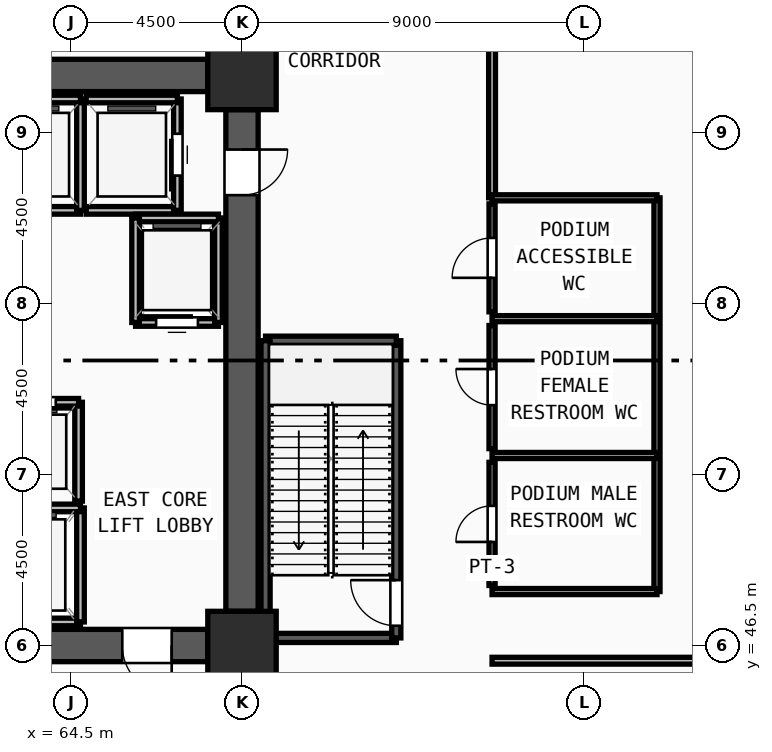
"""IFC4 building model, lengths in metres.
Left out: names, types, materials, properties, quantities, classifications, styles, units other than length and angle.
Written with IfcOpenShell. Run it as: python <this file> out.ifc"""

import sys

from ifc_helpers import new_model, si_unit, direction, frame, frame_2d, origin, origin_2d, place, context, subcontext, project, spatial, rectangle, extrude, source, transform, mapped, element, fill, save


model = new_model("IFC4")
c1 = context("Model", 3, precision=1e-05, world=origin(), true_north=direction((0.0, 1.0)))
c2 = subcontext(c1, "Body", "Model", "MODEL_VIEW")
j1 = project(units=[si_unit("LENGTHUNIT", "METRE"), si_unit("PLANEANGLEUNIT", "RADIAN")], contexts=[c1])
p1 = place(None, origin())
s1 = spatial("IfcSite", under=j1, at=p1, CompositionType="ELEMENT")
p2 = place(p1, origin())
s2 = spatial("IfcBuilding", under=s1, at=p2, CompositionType="ELEMENT")
p3 = place(p2, origin())
s3 = spatial("IfcBuildingStorey", under=s2, at=p3, CompositionType="ELEMENT", Elevation=0.0)
m1 = source(origin(), c2, "Body", "SweptSolid", [
    extrude(rectangle(XDim=1.8, YDim=1.8, at=origin_2d()), origin(), (0.0, 0.0, 1.0), 5.4),
])
for number, where, z_axis, x_axis in (
    (1, (69.0, 46.5, 0.0), (0.0, 0.0, 1.0), (1.0, 0.0, 0.0)),
    (2, (69.0, 61.5, 0.0), (0.0, 0.0, 1.0), (1.0, 0.0, 0.0)),
):
    element("IfcColumn", number, at=place(p3, frame(where, z_axis=z_axis, x_axis=x_axis)), inside=s3, PredefinedType="COLUMN", context=c2, shape_type="MappedRepresentation", body=[
        mapped(m1, transform((0.0, 0.0, 0.0), x_axis=(1.0, 0.0, 0.0), y_axis=(0.0, 1.0, 0.0), z_axis=(0.0, 0.0, 1.0), scale=1.0)),
    ])
p4 = place(p3, frame((60.9, 61.5, 0.0), z_axis=(0.0, 0.0, 1.0), x_axis=(1.0, 0.0, 0.0)))
e3 = element("IfcWall", 3, at=p4, inside=s3, PredefinedType="SHEAR", context=c2, shape_type="SweptSolid", body=[
    extrude(rectangle(XDim=7.2, YDim=0.85, at=frame_2d((3.6, 0.0))), origin(), (0.0, 0.0, 1.0), 5.15),
])
p5 = place(p3, frame((69.0, 60.6, 0.0), z_axis=(0.0, 0.0, 1.0), x_axis=(0.0, -1.0, 0.0)))
e4 = element("IfcWall", 4, at=p5, inside=s3, PredefinedType="SHEAR", context=c2, shape_type="SweptSolid", body=[
    extrude(rectangle(XDim=13.2, YDim=0.85, at=frame_2d((6.6, 0.0))), origin(), (0.0, 0.0, 1.0), 5.15),
])
m2 = source(origin(), c2, "Body", "SweptSolid", [
    extrude(rectangle(XDim=1.2, YDim=2.2, at=frame_2d((0.6, 1.1))), frame((0.0, 0.435, 0.0), z_axis=(0.0, -1.0, 0.0), x_axis=(1.0, 0.0, 0.0)), (0.0, 0.0, 1.0), 0.87),
])
p6 = place(p5, frame((1.05, 0.0, 0.0)))
e5 = element("IfcOpeningElement", 5, at=p6, cuts=e4, PredefinedType="OPENING", context=c2, shape_type="MappedRepresentation", body=[
    mapped(m2, transform((0.0, 0.0, 0.0), x_axis=(1.0, 0.0, 0.0), y_axis=(0.0, 1.0, 0.0), z_axis=(0.0, 0.0, 1.0), scale=1.0)),
])
p7 = place(p3, frame((68.1, 46.5, 0.0), z_axis=(0.0, 0.0, 1.0), x_axis=(-1.0, 0.0, 0.0)))
e6 = element("IfcWall", 6, at=p7, inside=s3, PredefinedType="SHEAR", context=c2, shape_type="SweptSolid", body=[
    extrude(rectangle(XDim=7.2, YDim=0.85, at=frame_2d((3.6, 0.0))), origin(), (0.0, 0.0, 1.0), 5.15),
])
m3 = source(origin(), c2, "Body", "SweptSolid", [
    extrude(rectangle(XDim=1.3, YDim=2.2, at=frame_2d((0.65, 1.1))), frame((0.0, 0.435, 0.0), z_axis=(0.0, -1.0, 0.0), x_axis=(1.0, 0.0, 0.0)), (0.0, 0.0, 1.0), 0.87),
])
p8 = place(p7, frame((0.95, 0.0, 0.0)))
e7 = element("IfcOpeningElement", 7, at=p8, cuts=e6, PredefinedType="OPENING", context=c2, shape_type="MappedRepresentation", body=[
    mapped(m3, transform((0.0, 0.0, 0.0), x_axis=(1.0, 0.0, 0.0), y_axis=(0.0, 1.0, 0.0), z_axis=(0.0, 0.0, 1.0), scale=1.0)),
])
p9 = place(p3, frame((69.62, 46.7, 0.0), z_axis=(0.0, 0.0, 1.0), x_axis=(1.0, 0.0, 0.0)))
e8 = element("IfcWall", 8, at=p9, inside=s3, PredefinedType="SOLIDWALL", context=c2, shape_type="SweptSolid", body=[
    extrude(rectangle(XDim=3.44, YDim=0.24, at=frame_2d((1.72, 0.0))), origin(), (0.0, 0.0, 1.0), 5.15),
])
p10 = place(p3, frame((73.06, 46.7, 0.0), z_axis=(0.0, 0.0, 1.0), x_axis=(0.0, 1.0, 0.0)))
e9 = element("IfcWall", 9, at=p10, inside=s3, PredefinedType="SOLIDWALL", context=c2, shape_type="SweptSolid", body=[
    extrude(rectangle(XDim=7.82, YDim=0.24, at=frame_2d((3.91, 0.0))), origin(), (0.0, 0.0, 1.0), 5.15),
])
m4 = source(origin(), c2, "Body", "SweptSolid", [
    extrude(rectangle(XDim=1.2, YDim=2.2, at=frame_2d((0.6, 1.1))), frame((0.0, 0.13, 0.0), z_axis=(0.0, -1.0, 0.0), x_axis=(1.0, 0.0, 0.0)), (0.0, 0.0, 1.0), 0.26),
])
p11 = place(p10, frame((0.32, 0.0, 0.0)))
e10 = element("IfcOpeningElement", 10, at=p11, cuts=e9, PredefinedType="OPENING", context=c2, shape_type="MappedRepresentation", body=[
    mapped(m4, transform((0.0, 0.0, 0.0), x_axis=(1.0, 0.0, 0.0), y_axis=(0.0, 1.0, 0.0), z_axis=(0.0, 0.0, 1.0), scale=1.0)),
])
p12 = place(p3, frame((73.06, 54.52, 0.0), z_axis=(0.0, 0.0, 1.0), x_axis=(-1.0, 0.0, 0.0)))
e11 = element("IfcWall", 11, at=p12, inside=s3, PredefinedType="SOLIDWALL", context=c2, shape_type="SweptSolid", body=[
    extrude(rectangle(XDim=3.44, YDim=0.24, at=frame_2d((1.72, 0.0))), origin(), (0.0, 0.0, 1.0), 5.15),
])
p13 = place(p3, frame((69.62, 54.52, 0.0), z_axis=(0.0, 0.0, 1.0), x_axis=(0.0, -1.0, 0.0)))
e12 = element("IfcWall", 12, at=p13, inside=s3, PredefinedType="SOLIDWALL", context=c2, shape_type="SweptSolid", body=[
    extrude(rectangle(XDim=7.82, YDim=0.24, at=frame_2d((3.91, 0.0))), origin(), (0.0, 0.0, 1.0), 5.15),
])
p14 = place(p3, frame((62.35, 47.12, 0.0), z_axis=(0.0, 0.0, 1.0), x_axis=(1.0, 0.0, 0.0)))
e13 = element("IfcWall", 13, at=p14, inside=s3, PredefinedType="SOLIDWALL", context=c2, shape_type="SweptSolid", body=[
    extrude(rectangle(XDim=2.4, YDim=0.2, at=frame_2d((1.2, 0.0))), origin(), (0.0, 0.0, 1.0), 5.15),
])
p15 = place(p3, frame((64.75, 47.12, 0.0), z_axis=(0.0, 0.0, 1.0), x_axis=(0.0, 1.0, 0.0)))
e14 = element("IfcWall", 14, at=p15, inside=s3, PredefinedType="SOLIDWALL", context=c2, shape_type="SweptSolid", body=[
    extrude(rectangle(XDim=3.0, YDim=0.2, at=frame_2d((1.5, 0.0))), origin(), (0.0, 0.0, 1.0), 5.15),
])
for number, where, z_axis, x_axis in (
    (15, (64.75, 50.12, 0.0), (0.0, 0.0, 1.0), (-1.0, 0.0, 0.0)),
    (16, (62.35, 57.95, 0.0), (0.0, 0.0, 1.0), (1.0, 0.0, 0.0)),
):
    element("IfcWall", number, at=place(p3, frame(where, z_axis=z_axis, x_axis=x_axis)), inside=s3, PredefinedType="SOLIDWALL", context=c2, shape_type="SweptSolid", body=[
        extrude(rectangle(XDim=2.4, YDim=0.2, at=frame_2d((1.2, 0.0))), origin(), (0.0, 0.0, 1.0), 5.15),
    ])
p16 = place(p3, frame((64.75, 57.95, 0.0), z_axis=(0.0, 0.0, 1.0), x_axis=(0.0, 1.0, 0.0)))
e17 = element("IfcWall", 17, at=p16, inside=s3, PredefinedType="SOLIDWALL", context=c2, shape_type="SweptSolid", body=[
    extrude(rectangle(XDim=2.93, YDim=0.2, at=frame_2d((1.465, 0.0))), origin(), (0.0, 0.0, 1.0), 5.15),
])
p17 = place(p3, frame((64.75, 60.88, 0.0), z_axis=(0.0, 0.0, 1.0), x_axis=(-1.0, 0.0, 0.0)))
e18 = element("IfcWall", 18, at=p17, inside=s3, PredefinedType="SOLIDWALL", context=c2, shape_type="SweptSolid", body=[
    extrude(rectangle(XDim=2.4, YDim=0.2, at=frame_2d((1.2, 0.0))), origin(), (0.0, 0.0, 1.0), 5.15),
])
p18 = place(p3, frame((64.9, 57.95, 0.0), z_axis=(0.0, 0.0, 1.0), x_axis=(1.0, 0.0, 0.0)))
e19 = element("IfcWall", 19, at=p18, inside=s3, PredefinedType="SOLIDWALL", context=c2, shape_type="SweptSolid", body=[
    extrude(rectangle(XDim=2.4, YDim=0.2, at=frame_2d((1.2, 0.0))), origin(), (0.0, 0.0, 1.0), 5.15),
])
p19 = place(p3, frame((67.3, 57.95, 0.0), z_axis=(0.0, 0.0, 1.0), x_axis=(0.0, 1.0, 0.0)))
e20 = element("IfcWall", 20, at=p19, inside=s3, PredefinedType="SOLIDWALL", context=c2, shape_type="SweptSolid", body=[
    extrude(rectangle(XDim=2.93, YDim=0.2, at=frame_2d((1.465, 0.0))), origin(), (0.0, 0.0, 1.0), 5.15),
])
m5 = source(origin(), c2, "Body", "SweptSolid", [
    extrude(rectangle(XDim=1.1, YDim=2.2, at=frame_2d((0.55, 1.1))), frame((0.0, 0.11, 0.0), z_axis=(0.0, -1.0, 0.0), x_axis=(1.0, 0.0, 0.0)), (0.0, 0.0, 1.0), 0.22),
])
p20 = place(p19, frame((0.915, 0.0, 0.0)))
e21 = element("IfcOpeningElement", 21, at=p20, cuts=e20, PredefinedType="OPENING", context=c2, shape_type="MappedRepresentation", body=[
    mapped(m5, transform((0.0, 0.0, 0.0), x_axis=(1.0, 0.0, 0.0), y_axis=(0.0, 1.0, 0.0), z_axis=(0.0, 0.0, 1.0), scale=1.0)),
])
p21 = place(p3, frame((67.3, 60.88, 0.0), z_axis=(0.0, 0.0, 1.0), x_axis=(-1.0, 0.0, 0.0)))
e22 = element("IfcWall", 22, at=p21, inside=s3, PredefinedType="SOLIDWALL", context=c2, shape_type="SweptSolid", body=[
    extrude(rectangle(XDim=2.4, YDim=0.2, at=frame_2d((1.2, 0.0))), origin(), (0.0, 0.0, 1.0), 5.15),
])
p22 = place(p3, frame((66.2, 55.0, 0.0), z_axis=(0.0, 0.0, 1.0), x_axis=(1.0, 0.0, 0.0)))
e23 = element("IfcWall", 23, at=p22, inside=s3, PredefinedType="SOLIDWALL", context=c2, shape_type="SweptSolid", body=[
    extrude(rectangle(XDim=2.18, YDim=0.2, at=frame_2d((1.09, 0.0))), origin(), (0.0, 0.0, 1.0), 5.15),
])
p23 = place(p22, frame((0.54, 0.0, 0.0)))
e24 = element("IfcOpeningElement", 24, at=p23, cuts=e23, PredefinedType="OPENING", context=c2, shape_type="MappedRepresentation", body=[
    mapped(m5, transform((0.0, 0.0, 0.0), x_axis=(1.0, 0.0, 0.0), y_axis=(0.0, 1.0, 0.0), z_axis=(0.0, 0.0, 1.0), scale=1.0)),
])
p24 = place(p3, frame((68.38, 55.0, 0.0), z_axis=(0.0, 0.0, 1.0), x_axis=(0.0, 1.0, 0.0)))
e25 = element("IfcWall", 25, at=p24, inside=s3, PredefinedType="SOLIDWALL", context=c2, shape_type="SweptSolid", body=[
    extrude(rectangle(XDim=2.75, YDim=0.2, at=frame_2d((1.375, 0.0))), origin(), (0.0, 0.0, 1.0), 5.15),
])
p25 = place(p3, frame((68.38, 57.75, 0.0), z_axis=(0.0, 0.0, 1.0), x_axis=(-1.0, 0.0, 0.0)))
e26 = element("IfcWall", 26, at=p25, inside=s3, PredefinedType="SOLIDWALL", context=c2, shape_type="SweptSolid", body=[
    extrude(rectangle(XDim=2.18, YDim=0.2, at=frame_2d((1.09, 0.0))), origin(), (0.0, 0.0, 1.0), 5.15),
])
p26 = place(p3, frame((66.2, 57.75, 0.0), z_axis=(0.0, 0.0, 1.0), x_axis=(0.0, -1.0, 0.0)))
e27 = element("IfcWall", 27, at=p26, inside=s3, PredefinedType="SOLIDWALL", context=c2, shape_type="SweptSolid", body=[
    extrude(rectangle(XDim=2.75, YDim=0.2, at=frame_2d((1.375, 0.0))), origin(), (0.0, 0.0, 1.0), 5.15),
])
p27 = place(p3, frame((64.7, 50.3, 0.0), z_axis=(0.0, 0.0, 1.0), x_axis=(0.0, 1.0, 0.0)))
e28 = element("IfcWall", 28, at=p27, inside=s3, PredefinedType="SOLIDWALL", context=c2, shape_type="SweptSolid", body=[
    extrude(rectangle(XDim=2.6, YDim=0.2, at=frame_2d((1.3, 0.0))), origin(), (0.0, 0.0, 1.0), 5.15),
])
p28 = place(p3, frame((64.7, 52.9, 0.0), z_axis=(0.0, 0.0, 1.0), x_axis=(-1.0, 0.0, 0.0)))
e29 = element("IfcWall", 29, at=p28, inside=s3, PredefinedType="SOLIDWALL", context=c2, shape_type="SweptSolid", body=[
    extrude(rectangle(XDim=2.3, YDim=0.2, at=frame_2d((1.15, 0.0))), origin(), (0.0, 0.0, 1.0), 5.15),
])
p29 = place(p28, frame((0.6, 0.0, 0.0)))
e30 = element("IfcOpeningElement", 30, at=p29, cuts=e29, PredefinedType="OPENING", context=c2, shape_type="MappedRepresentation", body=[
    mapped(m5, transform((0.0, 0.0, 0.0), x_axis=(1.0, 0.0, 0.0), y_axis=(0.0, 1.0, 0.0), z_axis=(0.0, 0.0, 1.0), scale=1.0)),
])
p30 = place(p3, frame((75.58, 48.08, 0.0), z_axis=(0.0, 0.0, 1.0), x_axis=(0.0, 1.0, 0.0)))
e31 = element("IfcWall", 31, at=p30, inside=s3, PredefinedType="PARTITIONING", context=c2, shape_type="SweptSolid", body=[
    extrude(rectangle(XDim=3.24, YDim=0.16, at=frame_2d((1.62, 0.0))), origin(), (0.0, 0.0, 1.0), 5.15),
])
m6 = source(origin(), c2, "Body", "SweptSolid", [
    extrude(rectangle(XDim=0.95, YDim=2.15, at=frame_2d((0.475, 1.075))), frame((0.0, 0.09, 0.0), z_axis=(0.0, -1.0, 0.0), x_axis=(1.0, 0.0, 0.0)), (0.0, 0.0, 1.0), 0.18),
])
p31 = place(p30, frame((1.145, 0.0, 0.0)))
e32 = element("IfcOpeningElement", 32, at=p31, cuts=e31, PredefinedType="OPENING", context=c2, shape_type="MappedRepresentation", body=[
    mapped(m6, transform((0.0, 0.0, 0.0), x_axis=(1.0, 0.0, 0.0), y_axis=(0.0, 1.0, 0.0), z_axis=(0.0, 0.0, 1.0), scale=1.0)),
])
p32 = place(p3, frame((75.58, 51.68, 0.0), z_axis=(0.0, 0.0, 1.0), x_axis=(0.0, 1.0, 0.0)))
e33 = element("IfcWall", 33, at=p32, inside=s3, PredefinedType="PARTITIONING", context=c2, shape_type="SweptSolid", body=[
    extrude(rectangle(XDim=3.24, YDim=0.16, at=frame_2d((1.62, 0.0))), origin(), (0.0, 0.0, 1.0), 5.15),
])
p33 = place(p32, frame((1.145, 0.0, 0.0)))
e34 = element("IfcOpeningElement", 34, at=p33, cuts=e33, PredefinedType="OPENING", context=c2, shape_type="MappedRepresentation", body=[
    mapped(m6, transform((0.0, 0.0, 0.0), x_axis=(1.0, 0.0, 0.0), y_axis=(0.0, 1.0, 0.0), z_axis=(0.0, 0.0, 1.0), scale=1.0)),
])
p34 = place(p3, frame((75.58, 55.28, 0.0), z_axis=(0.0, 0.0, 1.0), x_axis=(0.0, 1.0, 0.0)))
e35 = element("IfcWall", 35, at=p34, inside=s3, PredefinedType="PARTITIONING", context=c2, shape_type="SweptSolid", body=[
    extrude(rectangle(XDim=2.84, YDim=0.16, at=frame_2d((1.42, 0.0))), origin(), (0.0, 0.0, 1.0), 5.15),
])
m7 = source(origin(), c2, "Body", "SweptSolid", [
    extrude(rectangle(XDim=1.05, YDim=2.15, at=frame_2d((0.525, 1.075))), frame((0.0, 0.09, 0.0), z_axis=(0.0, -1.0, 0.0), x_axis=(1.0, 0.0, 0.0)), (0.0, 0.0, 1.0), 0.18),
])
p35 = place(p34, frame((0.895, 0.0, 0.0)))
e36 = element("IfcOpeningElement", 36, at=p35, cuts=e35, PredefinedType="OPENING", context=c2, shape_type="MappedRepresentation", body=[
    mapped(m7, transform((0.0, 0.0, 0.0), x_axis=(1.0, 0.0, 0.0), y_axis=(0.0, 1.0, 0.0), z_axis=(0.0, 0.0, 1.0), scale=1.0)),
])
p36 = place(p3, frame((75.58, 58.28, 0.0), z_axis=(0.0, 0.0, 1.0), x_axis=(0.0, 1.0, 0.0)))
e37 = element("IfcWall", 37, at=p36, inside=s3, PredefinedType="PARTITIONING", context=c2, shape_type="SweptSolid", body=[
    extrude(rectangle(XDim=9.82, YDim=0.18, at=frame_2d((4.91, 0.0))), origin(), (0.0, 0.0, 1.0), 5.15),
])
m8 = source(origin(), c2, "Body", "SweptSolid", [
    extrude(rectangle(XDim=1.5, YDim=2.2, at=frame_2d((0.75, 1.1))), frame((0.0, 0.1, 0.0), z_axis=(0.0, -1.0, 0.0), x_axis=(1.0, 0.0, 0.0)), (0.0, 0.0, 1.0), 0.2),
])
p37 = place(p36, frame((4.16, 0.0, 0.0)))
e38 = element("IfcOpeningElement", 38, at=p37, cuts=e37, PredefinedType="OPENING", context=c2, shape_type="MappedRepresentation", body=[
    mapped(m8, transform((0.0, 0.0, 0.0), x_axis=(1.0, 0.0, 0.0), y_axis=(0.0, 1.0, 0.0), z_axis=(0.0, 0.0, 1.0), scale=1.0)),
])
p38 = place(p3, frame((79.92, 47.92, 0.0), z_axis=(0.0, 0.0, 1.0), x_axis=(0.0, 1.0, 0.0)))
e39 = element("IfcWall", 39, at=p38, inside=s3, PredefinedType="PARTITIONING", context=c2, shape_type="SweptSolid", body=[
    extrude(rectangle(XDim=10.36, YDim=0.16, at=frame_2d((5.18, 0.0))), origin(), (0.0, 0.0, 1.0), 5.15),
])
for number, where, z_axis, x_axis in (
    (40, (75.58, 47.92, 0.0), (0.0, 0.0, 1.0), (1.0, 0.0, 0.0)),
    (41, (75.58, 51.5, 0.0), (0.0, 0.0, 1.0), (1.0, 0.0, 0.0)),
    (42, (75.58, 55.1, 0.0), (0.0, 0.0, 1.0), (1.0, 0.0, 0.0)),
    (43, (75.58, 58.28, 0.0), (0.0, 0.0, 1.0), (1.0, 0.0, 0.0)),
):
    element("IfcWall", number, at=place(p3, frame(where, z_axis=z_axis, x_axis=x_axis)), inside=s3, PredefinedType="PARTITIONING", context=c2, shape_type="SweptSolid", body=[
        extrude(rectangle(XDim=4.34, YDim=0.16, at=frame_2d((2.17, 0.0))), origin(), (0.0, 0.0, 1.0), 5.15),
    ])
p39 = place(p3, frame((75.58, 46.1, 0.0), z_axis=(0.0, 0.0, 1.0), x_axis=(1.0, 0.0, 0.0)))
e44 = element("IfcWall", 44, at=p39, inside=s3, PredefinedType="PARTITIONING", context=c2, shape_type="SweptSolid", body=[
    extrude(rectangle(XDim=29.195, YDim=0.18, at=frame_2d((14.597, 0.0))), origin(), (0.0, 0.0, 1.0), 5.15),
])
p40 = place(p3, frame((69.46, 61.95, 0.0), z_axis=(0.0, 0.0, 1.0), x_axis=(0.0, 1.0, 0.0)))
e45 = element("IfcWall", 45, at=p40, inside=s3, PredefinedType="PARTITIONING", context=c2, shape_type="SweptSolid", body=[
    extrude(rectangle(XDim=3.77, YDim=0.18, at=frame_2d((1.885, 0.0))), origin(), (0.0, 0.0, 1.0), 5.15),
])
m9 = source(origin(), c2, "Body", "SweptSolid", [
    extrude(rectangle(XDim=1.3, YDim=2.2, at=frame_2d((0.65, 1.1))), frame((0.0, 0.025, 0.0), z_axis=(0.0, -1.0, 0.0), x_axis=(1.0, 0.0, 0.0)), (0.0, 0.0, 1.0), 0.05),
])
p41 = place(p8, origin())
e46 = element("IfcDoor", 46, at=p41, inside=s3, OperationType="SINGLE_SWING_LEFT", PredefinedType="DOOR", context=c2, shape_type="MappedRepresentation", body=[
    mapped(m9, transform((0.0, 0.0, 0.0), x_axis=(1.0, 0.0, 0.0), y_axis=(0.0, 1.0, 0.0), z_axis=(0.0, 0.0, 1.0), scale=1.0)),
])
fill(e7, e46)
m10 = source(origin(), c2, "Body", "SweptSolid", [
    extrude(rectangle(XDim=1.2, YDim=2.2, at=frame_2d((0.6, 1.1))), frame((0.0, 0.025, 0.0), z_axis=(0.0, -1.0, 0.0), x_axis=(1.0, 0.0, 0.0)), (0.0, 0.0, 1.0), 0.05),
])
p42 = place(p6, origin())
e47 = element("IfcDoor", 47, at=p42, inside=s3, OperationType="SINGLE_SWING_LEFT", PredefinedType="DOOR", context=c2, shape_type="MappedRepresentation", body=[
    mapped(m10, transform((0.0, 0.0, 0.0), x_axis=(1.0, 0.0, 0.0), y_axis=(0.0, 1.0, 0.0), z_axis=(0.0, 0.0, 1.0), scale=1.0)),
])
fill(e5, e47)
p43 = place(p11, origin())
e48 = element("IfcDoor", 48, at=p43, inside=s3, OperationType="SINGLE_SWING_RIGHT", PredefinedType="DOOR", context=c2, shape_type="MappedRepresentation", body=[
    mapped(m10, transform((0.0, 0.0, 0.0), x_axis=(1.0, 0.0, 0.0), y_axis=(0.0, 1.0, 0.0), z_axis=(0.0, 0.0, 1.0), scale=1.0)),
])
fill(e10, e48)
m11 = source(origin(), c2, "Body", "SweptSolid", [
    extrude(rectangle(XDim=1.1, YDim=2.2, at=frame_2d((0.55, 1.1))), frame((0.0, 0.025, 0.0), z_axis=(0.0, -1.0, 0.0), x_axis=(1.0, 0.0, 0.0)), (0.0, 0.0, 1.0), 0.05),
])
p44 = place(p20, origin())
e49 = element("IfcDoor", 49, at=p44, inside=s3, OperationType="SLIDING_TO_LEFT", PredefinedType="DOOR", context=c2, shape_type="MappedRepresentation", body=[
    mapped(m11, transform((0.0, 0.0, 0.0), x_axis=(1.0, 0.0, 0.0), y_axis=(0.0, 1.0, 0.0), z_axis=(0.0, 0.0, 1.0), scale=1.0)),
])
fill(e21, e49)
p45 = place(p23, origin())
e50 = element("IfcDoor", 50, at=p45, inside=s3, OperationType="SLIDING_TO_LEFT", PredefinedType="DOOR", context=c2, shape_type="MappedRepresentation", body=[
    mapped(m11, transform((0.0, 0.0, 0.0), x_axis=(1.0, 0.0, 0.0), y_axis=(0.0, 1.0, 0.0), z_axis=(0.0, 0.0, 1.0), scale=1.0)),
])
fill(e24, e50)
p46 = place(p29, origin())
e51 = element("IfcDoor", 51, at=p46, inside=s3, OperationType="SLIDING_TO_LEFT", PredefinedType="DOOR", context=c2, shape_type="MappedRepresentation", body=[
    mapped(m11, transform((0.0, 0.0, 0.0), x_axis=(1.0, 0.0, 0.0), y_axis=(0.0, 1.0, 0.0), z_axis=(0.0, 0.0, 1.0), scale=1.0)),
])
fill(e30, e51)
m12 = source(origin(), c2, "Body", "SweptSolid", [
    extrude(rectangle(XDim=0.95, YDim=2.15, at=frame_2d((0.475, 1.075))), frame((0.0, 0.025, 0.0), z_axis=(0.0, -1.0, 0.0), x_axis=(1.0, 0.0, 0.0)), (0.0, 0.0, 1.0), 0.05),
])
p47 = place(p31, origin())
e52 = element("IfcDoor", 52, at=p47, inside=s3, OperationType="SINGLE_SWING_LEFT", PredefinedType="DOOR", context=c2, shape_type="MappedRepresentation", body=[
    mapped(m12, transform((0.0, 0.0, 0.0), x_axis=(1.0, 0.0, 0.0), y_axis=(0.0, 1.0, 0.0), z_axis=(0.0, 0.0, 1.0), scale=1.0)),
])
fill(e32, e52)
p48 = place(p33, origin())
e53 = element("IfcDoor", 53, at=p48, inside=s3, OperationType="SINGLE_SWING_RIGHT", PredefinedType="DOOR", context=c2, shape_type="MappedRepresentation", body=[
    mapped(m12, transform((0.0, 0.0, 0.0), x_axis=(1.0, 0.0, 0.0), y_axis=(0.0, 1.0, 0.0), z_axis=(0.0, 0.0, 1.0), scale=1.0)),
])
fill(e34, e53)
m13 = source(origin(), c2, "Body", "SweptSolid", [
    extrude(rectangle(XDim=1.05, YDim=2.15, at=frame_2d((0.525, 1.075))), frame((0.0, 0.025, 0.0), z_axis=(0.0, -1.0, 0.0), x_axis=(1.0, 0.0, 0.0)), (0.0, 0.0, 1.0), 0.05),
])
p49 = place(p35, origin())
e54 = element("IfcDoor", 54, at=p49, inside=s3, OperationType="SINGLE_SWING_LEFT", PredefinedType="DOOR", context=c2, shape_type="MappedRepresentation", body=[
    mapped(m13, transform((0.0, 0.0, 0.0), x_axis=(1.0, 0.0, 0.0), y_axis=(0.0, 1.0, 0.0), z_axis=(0.0, 0.0, 1.0), scale=1.0)),
])
fill(e36, e54)
save(model, sys.argv[1])
